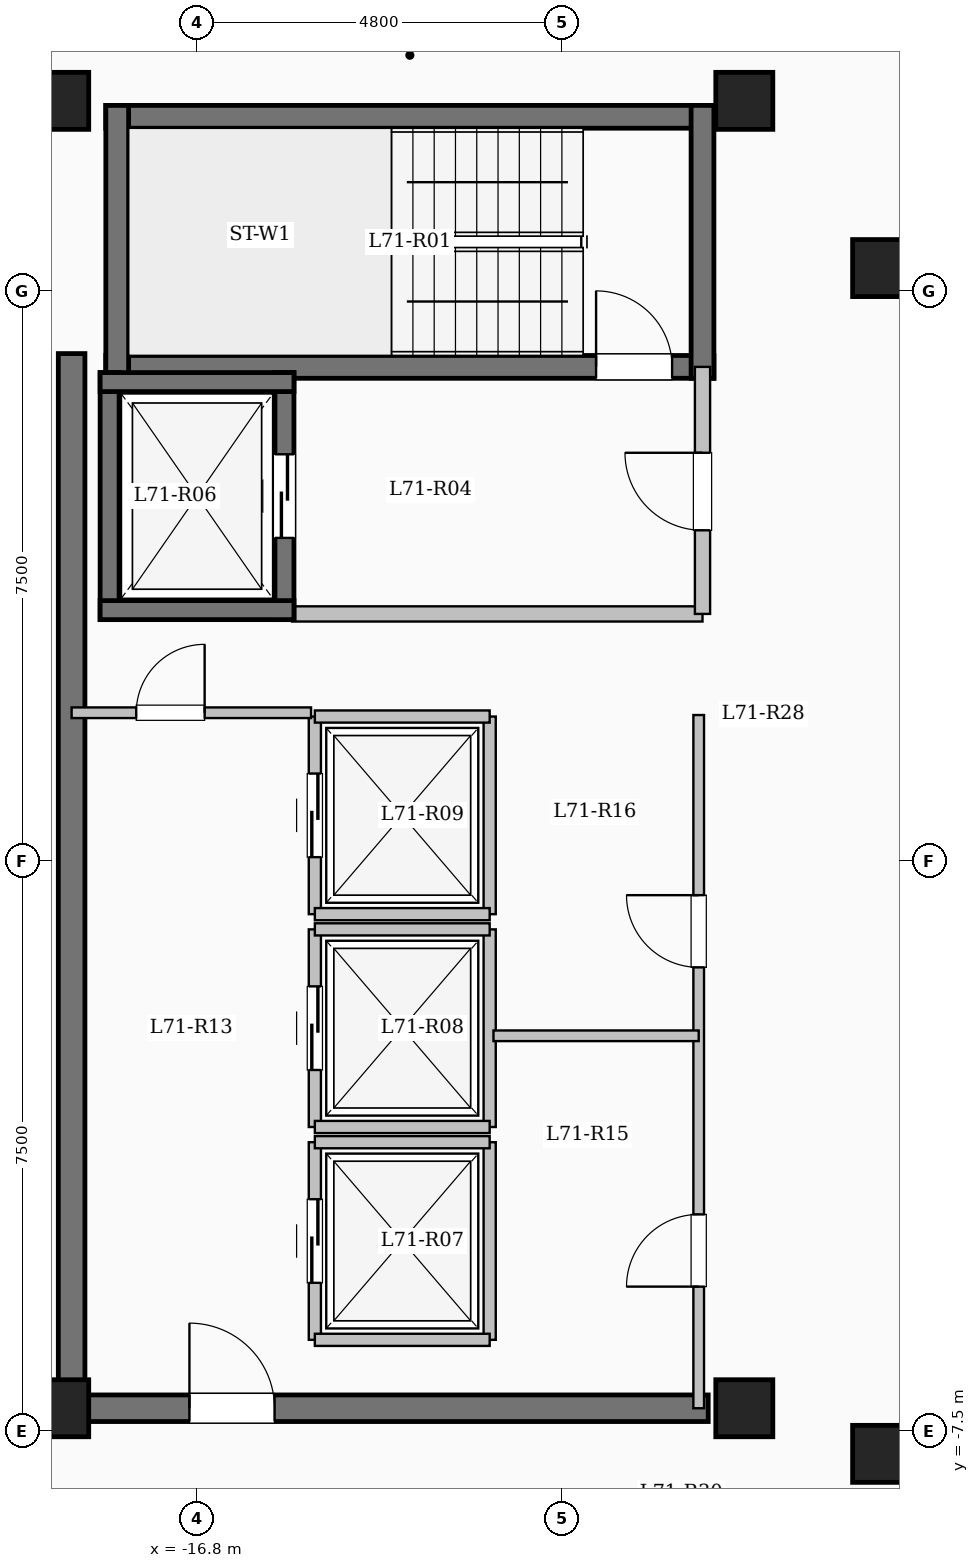
"""IFC4 building model, lengths in metres.
Left out: names, types, materials, properties, quantities, classifications, styles, units other than length and angle.
Written with IfcOpenShell. Run it as: python <this file> out.ifc"""

import sys

from ifc_helpers import new_model, si_unit, direction, frame, frame_2d, origin, origin_2d, place, context, subcontext, project, spatial, rectangle, extrude, element, fill, save


model = new_model("IFC4")
c1 = context("Model", 3, precision=1e-05, world=origin(), true_north=direction((0.0, 1.0)))
c2 = subcontext(c1, "Body", "Model", "MODEL_VIEW")
j1 = project(units=[si_unit("LENGTHUNIT", "METRE"), si_unit("PLANEANGLEUNIT", "RADIAN")], contexts=[c1])
p1 = place(None, origin())
s1 = spatial("IfcSite", under=j1, at=p1, CompositionType="ELEMENT")
p2 = place(p1, origin())
s2 = spatial("IfcBuilding", under=s1, at=p2, CompositionType="ELEMENT")
p3 = place(p2, frame((0.0, 0.0, 261.6)))
s3 = spatial("IfcBuildingStorey", under=s2, at=p3, CompositionType="ELEMENT", Elevation=261.6)
for number, where, z_axis, x_axis in (
    (1, (-7.8, -7.8, 0.0), (0.0, 0.0, 1.0), (1.0, 0.0, 0.0)),
    (2, (-7.8, 7.8, 0.0), (0.0, 0.0, 1.0), (1.0, 0.0, 0.0)),
    (3, (-9.6, -7.2, 0.0), (0.0, 0.0, 1.0), (1.0, 0.0, 0.0)),
    (4, (-9.6, 10.0, 0.0), (0.0, 0.0, 1.0), (1.0, 0.0, 0.0)),
    (5, (-18.6, -7.2, 0.0), (0.0, 0.0, 1.0), (1.0, 0.0, 0.0)),
    (6, (-18.6, 10.0, 0.0), (0.0, 0.0, 1.0), (1.0, 0.0, 0.0)),
):
    element("IfcColumn", number, at=place(p3, frame(where, z_axis=z_axis, x_axis=x_axis)), inside=s3, PredefinedType="COLUMN", context=c2, shape_type="SweptSolid", body=[
        extrude(rectangle(XDim=0.75, YDim=0.75, at=origin_2d()), origin(), (0.0, 0.0, 1.0), 3.35),
    ])
p4 = place(p3, frame((-18.0, 9.79, 0.0), z_axis=(0.0, 0.0, 1.0), x_axis=(1.0, 0.0, 0.0)))
e7 = element("IfcWall", 7, at=p4, inside=s3, PredefinedType="SHEAR", context=c2, shape_type="SweptSolid", body=[
    extrude(rectangle(XDim=8.0, YDim=0.3, at=frame_2d((4.0, 0.0))), origin(), (0.0, 0.0, 1.0), 3.35),
])
p5 = place(p3, frame((-18.0, 6.5, 0.0), z_axis=(0.0, 0.0, 1.0), x_axis=(1.0, 0.0, 0.0)))
e8 = element("IfcWall", 8, at=p5, inside=s3, PredefinedType="SHEAR", context=c2, shape_type="SweptSolid", body=[
    extrude(rectangle(XDim=8.0, YDim=0.3, at=frame_2d((4.0, 0.0))), origin(), (0.0, 0.0, 1.0), 3.35),
])
p6 = place(p5, frame((6.45, 0.0, 0.0)))
e9 = element("IfcOpeningElement", 9, at=p6, cuts=e8, PredefinedType="OPENING", context=c2, shape_type="SweptSolid", body=[
    extrude(rectangle(XDim=1.0, YDim=2.15, at=frame_2d((0.5, 1.075))), frame((0.0, 0.16, 0.0), z_axis=(0.0, -1.0, 0.0), x_axis=(1.0, 0.0, 0.0)), (0.0, 0.0, 1.0), 0.32),
])
for number, where, z_axis, x_axis in (
    (10, (-17.85, 6.35, 0.0), (0.0, 0.0, 1.0), (0.0, 1.0, 0.0)),
    (11, (-10.15, 6.35, 0.0), (0.0, 0.0, 1.0), (0.0, 1.0, 0.0)),
):
    element("IfcWall", number, at=place(p3, frame(where, z_axis=z_axis, x_axis=x_axis)), inside=s3, PredefinedType="SHEAR", context=c2, shape_type="SweptSolid", body=[
        extrude(rectangle(XDim=3.59, YDim=0.3, at=frame_2d((1.795, 0.0))), origin(), (0.0, 0.0, 1.0), 3.35),
    ])
p7 = place(p3, frame((-15.55, 3.25, 0.0), z_axis=(0.0, 0.0, 1.0), x_axis=(1.0, 0.0, 0.0)))
e12 = element("IfcWall", 12, at=p7, inside=s3, PredefinedType="SOLIDWALL", context=c2, shape_type="SweptSolid", body=[
    extrude(rectangle(XDim=5.4, YDim=0.2, at=frame_2d((2.7, 0.0))), origin(), (0.0, 0.0, 1.0), 3.1),
])
p8 = place(p3, frame((-10.15, 3.25, 0.0), z_axis=(0.0, 0.0, 1.0), x_axis=(0.0, 1.0, 0.0)))
e13 = element("IfcWall", 13, at=p8, inside=s3, PredefinedType="SOLIDWALL", context=c2, shape_type="SweptSolid", body=[
    extrude(rectangle(XDim=3.25, YDim=0.2, at=frame_2d((1.625, 0.0))), origin(), (0.0, 0.0, 1.0), 3.1),
])
p9 = place(p8, frame((1.1, 0.0, 0.0)))
e14 = element("IfcOpeningElement", 14, at=p9, cuts=e13, PredefinedType="OPENING", context=c2, shape_type="SweptSolid", body=[
    extrude(rectangle(XDim=1.02, YDim=2.15, at=frame_2d((0.51, 1.075))), frame((0.0, 0.11, 0.0), z_axis=(0.0, -1.0, 0.0), x_axis=(1.0, 0.0, 0.0)), (0.0, 0.0, 1.0), 0.22),
])
p10 = place(p3, frame((-17.95, 3.175, 0.0), z_axis=(0.0, 0.0, 1.0), x_axis=(0.0, 1.0, 0.0)))
e15 = element("IfcWall", 15, at=p10, inside=s3, PredefinedType="SHEAR", context=c2, shape_type="SweptSolid", body=[
    extrude(rectangle(XDim=3.25, YDim=0.25, at=frame_2d((1.625, 0.0))), origin(), (0.0, 0.0, 1.0), 3.35),
])
p11 = place(p3, frame((-15.65, 3.175, 0.0), z_axis=(0.0, 0.0, 1.0), x_axis=(0.0, 1.0, 0.0)))
e16 = element("IfcWall", 16, at=p11, inside=s3, PredefinedType="SHEAR", context=c2, shape_type="SweptSolid", body=[
    extrude(rectangle(XDim=3.25, YDim=0.25, at=frame_2d((1.625, 0.0))), origin(), (0.0, 0.0, 1.0), 3.35),
])
p12 = place(p11, frame((1.075, 0.0, 0.0)))
e17 = element("IfcOpeningElement", 17, at=p12, cuts=e16, PredefinedType="OPENING", context=c2, shape_type="SweptSolid", body=[
    extrude(rectangle(XDim=1.1, YDim=2.15, at=frame_2d((0.55, 1.075))), frame((0.0, 0.135, 0.0), z_axis=(0.0, -1.0, 0.0), x_axis=(1.0, 0.0, 0.0)), (0.0, 0.0, 1.0), 0.27),
])
for number, where, z_axis, x_axis in (
    (18, (-18.075, 3.3, 0.0), (0.0, 0.0, 1.0), (1.0, 0.0, 0.0)),
    (19, (-18.075, 6.3, 0.0), (0.0, 0.0, 1.0), (1.0, 0.0, 0.0)),
):
    element("IfcWall", number, at=place(p3, frame(where, z_axis=z_axis, x_axis=x_axis)), inside=s3, PredefinedType="SHEAR", context=c2, shape_type="SweptSolid", body=[
        extrude(rectangle(XDim=2.55, YDim=0.25, at=frame_2d((1.275, 0.0))), origin(), (0.0, 0.0, 1.0), 3.35),
    ])
p13 = place(p3, frame((-15.25, -6.3, 0.0), z_axis=(0.0, 0.0, 1.0), x_axis=(0.0, 1.0, 0.0)))
e20 = element("IfcWall", 20, at=p13, inside=s3, PredefinedType="SOLIDWALL", context=c2, shape_type="SweptSolid", body=[
    extrude(rectangle(XDim=2.6, YDim=0.16, at=frame_2d((1.3, 0.0))), origin(), (0.0, 0.0, 1.0), 3.1),
])
p14 = place(p13, frame((0.75, 0.0, 0.0)))
e21 = element("IfcOpeningElement", 21, at=p14, cuts=e20, PredefinedType="OPENING", context=c2, shape_type="SweptSolid", body=[
    extrude(rectangle(XDim=1.1, YDim=2.15, at=frame_2d((0.55, 1.075))), frame((0.0, 0.09, 0.0), z_axis=(0.0, -1.0, 0.0), x_axis=(1.0, 0.0, 0.0)), (0.0, 0.0, 1.0), 0.18),
])
p15 = place(p3, frame((-12.95, -6.3, 0.0), z_axis=(0.0, 0.0, 1.0), x_axis=(0.0, 1.0, 0.0)))
e22 = element("IfcWall", 22, at=p15, inside=s3, PredefinedType="SOLIDWALL", context=c2, shape_type="SweptSolid", body=[
    extrude(rectangle(XDim=2.6, YDim=0.16, at=frame_2d((1.3, 0.0))), origin(), (0.0, 0.0, 1.0), 3.1),
])
for number, where, z_axis, x_axis in (
    (23, (-15.25, -6.3, 0.0), (0.0, 0.0, 1.0), (1.0, 0.0, 0.0)),
    (24, (-15.25, -3.7, 0.0), (0.0, 0.0, 1.0), (1.0, 0.0, 0.0)),
):
    element("IfcWall", number, at=place(p3, frame(where, z_axis=z_axis, x_axis=x_axis)), inside=s3, PredefinedType="SOLIDWALL", context=c2, shape_type="SweptSolid", body=[
        extrude(rectangle(XDim=2.3, YDim=0.16, at=frame_2d((1.15, 0.0))), origin(), (0.0, 0.0, 1.0), 3.1),
    ])
p16 = place(p3, frame((-15.25, -3.5, 0.0), z_axis=(0.0, 0.0, 1.0), x_axis=(0.0, 1.0, 0.0)))
e25 = element("IfcWall", 25, at=p16, inside=s3, PredefinedType="SOLIDWALL", context=c2, shape_type="SweptSolid", body=[
    extrude(rectangle(XDim=2.6, YDim=0.16, at=frame_2d((1.3, 0.0))), origin(), (0.0, 0.0, 1.0), 3.1),
])
p17 = place(p16, frame((0.75, 0.0, 0.0)))
e26 = element("IfcOpeningElement", 26, at=p17, cuts=e25, PredefinedType="OPENING", context=c2, shape_type="SweptSolid", body=[
    extrude(rectangle(XDim=1.1, YDim=2.15, at=frame_2d((0.55, 1.075))), frame((0.0, 0.09, 0.0), z_axis=(0.0, -1.0, 0.0), x_axis=(1.0, 0.0, 0.0)), (0.0, 0.0, 1.0), 0.18),
])
p18 = place(p3, frame((-12.95, -3.5, 0.0), z_axis=(0.0, 0.0, 1.0), x_axis=(0.0, 1.0, 0.0)))
e27 = element("IfcWall", 27, at=p18, inside=s3, PredefinedType="SOLIDWALL", context=c2, shape_type="SweptSolid", body=[
    extrude(rectangle(XDim=2.6, YDim=0.16, at=frame_2d((1.3, 0.0))), origin(), (0.0, 0.0, 1.0), 3.1),
])
for number, where, z_axis, x_axis in (
    (28, (-15.25, -3.5, 0.0), (0.0, 0.0, 1.0), (1.0, 0.0, 0.0)),
    (29, (-15.25, -0.9, 0.0), (0.0, 0.0, 1.0), (1.0, 0.0, 0.0)),
):
    element("IfcWall", number, at=place(p3, frame(where, z_axis=z_axis, x_axis=x_axis)), inside=s3, PredefinedType="SOLIDWALL", context=c2, shape_type="SweptSolid", body=[
        extrude(rectangle(XDim=2.3, YDim=0.16, at=frame_2d((1.15, 0.0))), origin(), (0.0, 0.0, 1.0), 3.1),
    ])
p19 = place(p3, frame((-15.25, -0.7, 0.0), z_axis=(0.0, 0.0, 1.0), x_axis=(0.0, 1.0, 0.0)))
e30 = element("IfcWall", 30, at=p19, inside=s3, PredefinedType="SOLIDWALL", context=c2, shape_type="SweptSolid", body=[
    extrude(rectangle(XDim=2.6, YDim=0.16, at=frame_2d((1.3, 0.0))), origin(), (0.0, 0.0, 1.0), 3.1),
])
p20 = place(p19, frame((0.75, 0.0, 0.0)))
e31 = element("IfcOpeningElement", 31, at=p20, cuts=e30, PredefinedType="OPENING", context=c2, shape_type="SweptSolid", body=[
    extrude(rectangle(XDim=1.1, YDim=2.15, at=frame_2d((0.55, 1.075))), frame((0.0, 0.09, 0.0), z_axis=(0.0, -1.0, 0.0), x_axis=(1.0, 0.0, 0.0)), (0.0, 0.0, 1.0), 0.18),
])
p21 = place(p3, frame((-12.95, -0.7, 0.0), z_axis=(0.0, 0.0, 1.0), x_axis=(0.0, 1.0, 0.0)))
e32 = element("IfcWall", 32, at=p21, inside=s3, PredefinedType="SOLIDWALL", context=c2, shape_type="SweptSolid", body=[
    extrude(rectangle(XDim=2.6, YDim=0.16, at=frame_2d((1.3, 0.0))), origin(), (0.0, 0.0, 1.0), 3.1),
])
for number, where, z_axis, x_axis in (
    (33, (-15.25, -0.7, 0.0), (0.0, 0.0, 1.0), (1.0, 0.0, 0.0)),
    (34, (-15.25, 1.9, 0.0), (0.0, 0.0, 1.0), (1.0, 0.0, 0.0)),
):
    element("IfcWall", number, at=place(p3, frame(where, z_axis=z_axis, x_axis=x_axis)), inside=s3, PredefinedType="SOLIDWALL", context=c2, shape_type="SweptSolid", body=[
        extrude(rectangle(XDim=2.3, YDim=0.16, at=frame_2d((1.15, 0.0))), origin(), (0.0, 0.0, 1.0), 3.1),
    ])
p22 = place(p3, frame((-18.45, -7.375, 0.0), z_axis=(0.0, 0.0, 1.0), x_axis=(0.0, 1.0, 0.0)))
e35 = element("IfcWall", 35, at=p22, inside=s3, PredefinedType="SHEAR", context=c2, shape_type="SweptSolid", body=[
    extrude(rectangle(XDim=14.05, YDim=0.35, at=frame_2d((7.025, 0.0))), origin(), (0.0, 0.0, 1.0), 3.35),
])
p23 = place(p3, frame((-18.625, -7.2, 0.0), z_axis=(0.0, 0.0, 1.0), x_axis=(1.0, 0.0, 0.0)))
e36 = element("IfcWall", 36, at=p23, inside=s3, PredefinedType="SHEAR", context=c2, shape_type="SweptSolid", body=[
    extrude(rectangle(XDim=8.55, YDim=0.35, at=frame_2d((4.275, 0.0))), origin(), (0.0, 0.0, 1.0), 3.35),
])
p24 = place(p23, frame((1.725, 0.0, 0.0)))
e37 = element("IfcOpeningElement", 37, at=p24, cuts=e36, PredefinedType="OPENING", context=c2, shape_type="SweptSolid", body=[
    extrude(rectangle(XDim=1.12, YDim=2.15, at=frame_2d((0.56, 1.075))), frame((0.0, 0.185, 0.0), z_axis=(0.0, -1.0, 0.0), x_axis=(1.0, 0.0, 0.0)), (0.0, 0.0, 1.0), 0.37),
])
p25 = place(p3, frame((-18.45, 1.95, 0.0), z_axis=(0.0, 0.0, 1.0), x_axis=(1.0, 0.0, 0.0)))
e38 = element("IfcWall", 38, at=p25, inside=s3, PredefinedType="PARTITIONING", context=c2, shape_type="SweptSolid", body=[
    extrude(rectangle(XDim=3.15, YDim=0.14, at=frame_2d((1.575, 0.0))), origin(), (0.0, 0.0, 1.0), 3.1),
])
p26 = place(p25, frame((0.85, 0.0, 0.0)))
e39 = element("IfcOpeningElement", 39, at=p26, cuts=e38, PredefinedType="OPENING", context=c2, shape_type="SweptSolid", body=[
    extrude(rectangle(XDim=0.9, YDim=2.08, at=frame_2d((0.45, 1.04))), frame((0.0, 0.08, 0.0), z_axis=(0.0, -1.0, 0.0), x_axis=(1.0, 0.0, 0.0)), (0.0, 0.0, 1.0), 0.16),
])
p27 = place(p3, frame((-10.2, -7.2, 0.0), z_axis=(0.0, 0.0, 1.0), x_axis=(0.0, 1.0, 0.0)))
e40 = element("IfcWall", 40, at=p27, inside=s3, PredefinedType="PARTITIONING", context=c2, shape_type="SweptSolid", body=[
    extrude(rectangle(XDim=9.12, YDim=0.14, at=frame_2d((4.56, 0.0))), origin(), (0.0, 0.0, 1.0), 3.1),
])
p28 = place(p27, frame((1.6, 0.0, 0.0)))
e41 = element("IfcOpeningElement", 41, at=p28, cuts=e40, PredefinedType="OPENING", context=c2, shape_type="SweptSolid", body=[
    extrude(rectangle(XDim=0.95, YDim=2.12, at=frame_2d((0.475, 1.06))), frame((0.0, 0.08, 0.0), z_axis=(0.0, -1.0, 0.0), x_axis=(1.0, 0.0, 0.0)), (0.0, 0.0, 1.0), 0.16),
])
p29 = place(p27, frame((5.8, 0.0, 0.0)))
e42 = element("IfcOpeningElement", 42, at=p29, cuts=e40, PredefinedType="OPENING", context=c2, shape_type="SweptSolid", body=[
    extrude(rectangle(XDim=0.95, YDim=2.12, at=frame_2d((0.475, 1.06))), frame((0.0, 0.08, 0.0), z_axis=(0.0, -1.0, 0.0), x_axis=(1.0, 0.0, 0.0)), (0.0, 0.0, 1.0), 0.16),
])
p30 = place(p3, frame((-12.9, -2.3, 0.0), z_axis=(0.0, 0.0, 1.0), x_axis=(1.0, 0.0, 0.0)))
e43 = element("IfcWall", 43, at=p30, inside=s3, PredefinedType="PARTITIONING", context=c2, shape_type="SweptSolid", body=[
    extrude(rectangle(XDim=2.7, YDim=0.14, at=frame_2d((1.35, 0.0))), origin(), (0.0, 0.0, 1.0), 3.1),
])
p31 = place(p3, frame((-22.68, -7.25, 0.0), z_axis=(0.0, 0.0, 1.0), x_axis=(1.0, 0.0, 0.0)))
e44 = element("IfcWall", 44, at=p31, inside=s3, PredefinedType="PARTITIONING", context=c2, shape_type="SweptSolid", body=[
    extrude(rectangle(XDim=4.23, YDim=0.15, at=frame_2d((2.115, 0.0))), origin(), (0.0, 0.0, 1.0), 3.1),
])
p32 = place(p31, frame((1.63, 0.0, 0.0)))
e45 = element("IfcOpeningElement", 45, at=p32, cuts=e44, PredefinedType="OPENING", context=c2, shape_type="SweptSolid", body=[
    extrude(rectangle(XDim=1.08, YDim=2.15, at=frame_2d((0.54, 1.075))), frame((0.0, 0.085, 0.0), z_axis=(0.0, -1.0, 0.0), x_axis=(1.0, 0.0, 0.0)), (0.0, 0.0, 1.0), 0.17),
])
p33 = place(p6, origin())
e46 = element("IfcDoor", 46, at=p33, inside=s3, OperationType="SINGLE_SWING_LEFT", PredefinedType="DOOR", context=c2, shape_type="SweptSolid", body=[
    extrude(rectangle(XDim=1.0, YDim=2.15, at=frame_2d((0.5, 1.075))), frame((0.0, 0.025, 0.0), z_axis=(0.0, -1.0, 0.0), x_axis=(1.0, 0.0, 0.0)), (0.0, 0.0, 1.0), 0.05),
])
fill(e9, e46)
p34 = place(p9, origin())
e47 = element("IfcDoor", 47, at=p34, inside=s3, OperationType="SINGLE_SWING_RIGHT", PredefinedType="DOOR", context=c2, shape_type="SweptSolid", body=[
    extrude(rectangle(XDim=1.02, YDim=2.15, at=frame_2d((0.51, 1.075))), frame((0.0, 0.025, 0.0), z_axis=(0.0, -1.0, 0.0), x_axis=(1.0, 0.0, 0.0)), (0.0, 0.0, 1.0), 0.05),
])
fill(e14, e47)
p35 = place(p12, origin())
e48 = element("IfcDoor", 48, at=p35, inside=s3, OperationType="SLIDING_TO_LEFT", PredefinedType="DOOR", context=c2, shape_type="SweptSolid", body=[
    extrude(rectangle(XDim=1.1, YDim=2.15, at=frame_2d((0.55, 1.075))), frame((0.0, 0.025, 0.0), z_axis=(0.0, -1.0, 0.0), x_axis=(1.0, 0.0, 0.0)), (0.0, 0.0, 1.0), 0.05),
])
fill(e17, e48)
p36 = place(p14, origin())
e49 = element("IfcDoor", 49, at=p36, inside=s3, OperationType="SLIDING_TO_LEFT", PredefinedType="DOOR", context=c2, shape_type="SweptSolid", body=[
    extrude(rectangle(XDim=1.1, YDim=2.15, at=frame_2d((0.55, 1.075))), frame((0.0, 0.025, 0.0), z_axis=(0.0, -1.0, 0.0), x_axis=(1.0, 0.0, 0.0)), (0.0, 0.0, 1.0), 0.05),
])
fill(e21, e49)
p37 = place(p17, origin())
e50 = element("IfcDoor", 50, at=p37, inside=s3, OperationType="SLIDING_TO_LEFT", PredefinedType="DOOR", context=c2, shape_type="SweptSolid", body=[
    extrude(rectangle(XDim=1.1, YDim=2.15, at=frame_2d((0.55, 1.075))), frame((0.0, 0.025, 0.0), z_axis=(0.0, -1.0, 0.0), x_axis=(1.0, 0.0, 0.0)), (0.0, 0.0, 1.0), 0.05),
])
fill(e26, e50)
p38 = place(p20, origin())
e51 = element("IfcDoor", 51, at=p38, inside=s3, OperationType="SLIDING_TO_LEFT", PredefinedType="DOOR", context=c2, shape_type="SweptSolid", body=[
    extrude(rectangle(XDim=1.1, YDim=2.15, at=frame_2d((0.55, 1.075))), frame((0.0, 0.025, 0.0), z_axis=(0.0, -1.0, 0.0), x_axis=(1.0, 0.0, 0.0)), (0.0, 0.0, 1.0), 0.05),
])
fill(e31, e51)
p39 = place(p24, origin())
e52 = element("IfcDoor", 52, at=p39, inside=s3, OperationType="SINGLE_SWING_LEFT", PredefinedType="DOOR", context=c2, shape_type="SweptSolid", body=[
    extrude(rectangle(XDim=1.12, YDim=2.15, at=frame_2d((0.56, 1.075))), frame((0.0, 0.025, 0.0), z_axis=(0.0, -1.0, 0.0), x_axis=(1.0, 0.0, 0.0)), (0.0, 0.0, 1.0), 0.05),
])
fill(e37, e52)
p40 = place(p26, origin())
e53 = element("IfcDoor", 53, at=p40, inside=s3, OperationType="SINGLE_SWING_RIGHT", PredefinedType="DOOR", context=c2, shape_type="SweptSolid", body=[
    extrude(rectangle(XDim=0.9, YDim=2.08, at=frame_2d((0.45, 1.04))), frame((0.0, 0.025, 0.0), z_axis=(0.0, -1.0, 0.0), x_axis=(1.0, 0.0, 0.0)), (0.0, 0.0, 1.0), 0.05),
])
fill(e39, e53)
p41 = place(p28, origin())
e54 = element("IfcDoor", 54, at=p41, inside=s3, OperationType="SINGLE_SWING_LEFT", PredefinedType="DOOR", context=c2, shape_type="SweptSolid", body=[
    extrude(rectangle(XDim=0.95, YDim=2.12, at=frame_2d((0.475, 1.06))), frame((0.0, 0.025, 0.0), z_axis=(0.0, -1.0, 0.0), x_axis=(1.0, 0.0, 0.0)), (0.0, 0.0, 1.0), 0.05),
])
fill(e41, e54)
p42 = place(p29, origin())
e55 = element("IfcDoor", 55, at=p42, inside=s3, OperationType="SINGLE_SWING_RIGHT", PredefinedType="DOOR", context=c2, shape_type="SweptSolid", body=[
    extrude(rectangle(XDim=0.95, YDim=2.12, at=frame_2d((0.475, 1.06))), frame((0.0, 0.025, 0.0), z_axis=(0.0, -1.0, 0.0), x_axis=(1.0, 0.0, 0.0)), (0.0, 0.0, 1.0), 0.05),
])
fill(e42, e55)
save(model, sys.argv[1])
